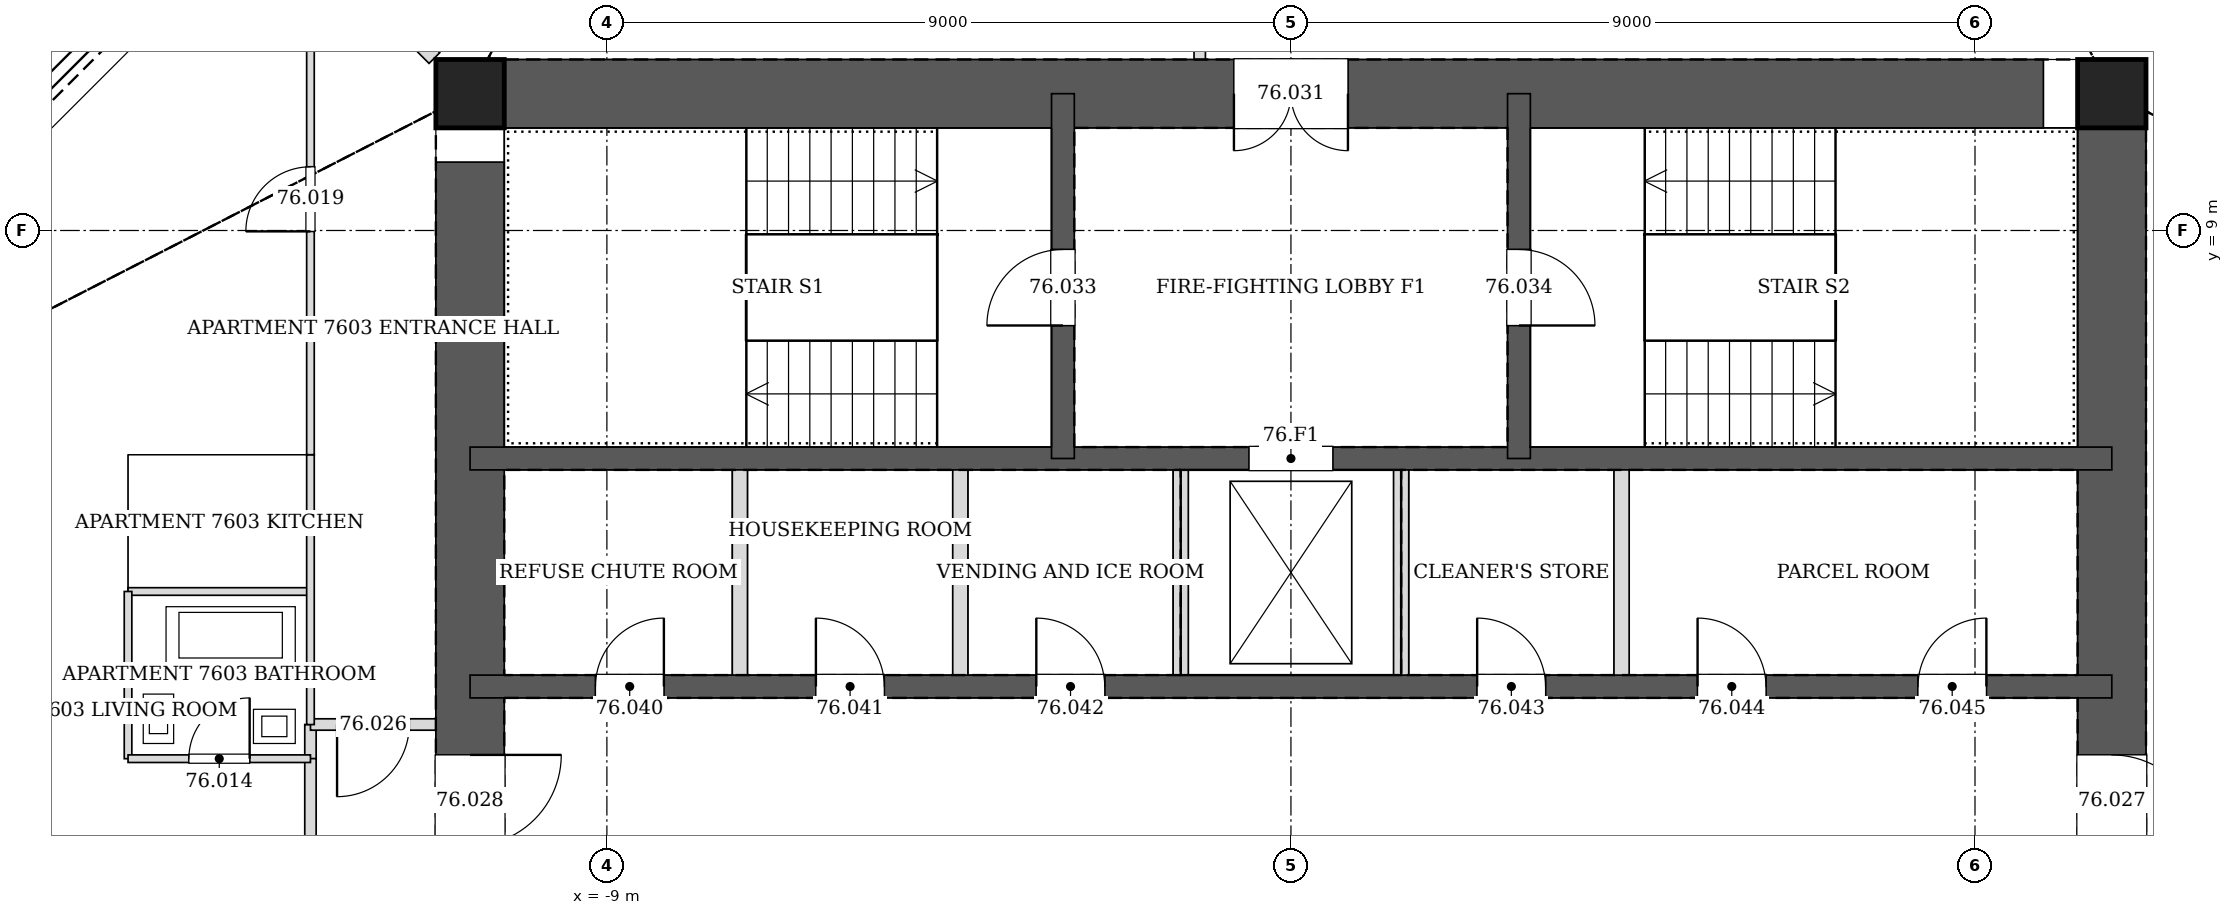
"""IFC4 building model, lengths in metres.
Left out: names, types, materials, properties, quantities, classifications, styles, units other than length and angle.
Written with IfcOpenShell. Run it as: python <this file> out.ifc"""

import sys

from ifc_helpers import new_model, si_unit, direction, frame, frame_2d, origin, origin_2d, place, context, subcontext, project, spatial, rectangle, hollow_rectangle, extrude, element, fill, save


model = new_model("IFC4")
c1 = context("Model", 3, precision=1e-05, world=origin(), true_north=direction((0.0, 1.0)))
c2 = subcontext(c1, "Body", "Model", "MODEL_VIEW")
j1 = project(units=[si_unit("LENGTHUNIT", "METRE"), si_unit("PLANEANGLEUNIT", "RADIAN")], contexts=[c1])
p1 = place(None, origin())
s1 = spatial("IfcSite", under=j1, at=p1, CompositionType="ELEMENT")
p2 = place(p1, origin())
s2 = spatial("IfcBuilding", under=s1, at=p2, CompositionType="ELEMENT")
p3 = place(p2, frame((0.0, 0.0, 308.2)))
s3 = spatial("IfcBuildingStorey", under=s2, at=p3, CompositionType="ELEMENT", Elevation=308.2)
for number, where, z_axis, x_axis in (
    (1, (10.8, 10.8, 0.0), (0.0, 0.0, 1.0), (1.0, 0.0, 0.0)),
    (2, (-10.8, 10.8, 0.0), (0.0, 0.0, 1.0), (1.0, 0.0, 0.0)),
):
    element("IfcColumn", number, at=place(p3, frame(where, z_axis=z_axis, x_axis=x_axis)), inside=s3, PredefinedType="COLUMN", context=c2, shape_type="SweptSolid", body=[
        extrude(hollow_rectangle(XDim=0.9, YDim=0.9, WallThickness=0.04, at=origin_2d()), origin(), (0.0, 0.0, 1.0), 3.4),
    ])
p4 = place(p3, frame((10.8, -10.8, 0.0), z_axis=(0.0, 0.0, 1.0), x_axis=(0.0, 1.0, 0.0)))
e3 = element("IfcWall", 3, at=p4, inside=s3, PredefinedType="SOLIDWALL", context=c2, shape_type="SweptSolid", body=[
    extrude(rectangle(XDim=21.6, YDim=0.9, at=frame_2d((10.8, 0.0))), origin(), (0.0, 0.0, 1.0), 3.4),
])
p5 = place(p4, frame((11.7, 0.0, 0.0)))
e4 = element("IfcOpeningElement", 4, at=p5, cuts=e3, PredefinedType="OPENING", context=c2, shape_type="SweptSolid", body=[
    extrude(rectangle(XDim=1.2, YDim=2.1, at=frame_2d((0.6, 1.05))), frame((0.0, 0.46, 0.0), z_axis=(0.0, -1.0, 0.0), x_axis=(1.0, 0.0, 0.0)), (0.0, 0.0, 1.0), 0.92),
])
p6 = place(p4, frame((8.7, 0.0, 0.0)))
e5 = element("IfcOpeningElement", 5, at=p6, cuts=e3, PredefinedType="OPENING", context=c2, shape_type="SweptSolid", body=[
    extrude(rectangle(XDim=1.2, YDim=2.1, at=frame_2d((0.6, 1.05))), frame((0.0, 0.46, 0.0), z_axis=(0.0, -1.0, 0.0), x_axis=(1.0, 0.0, 0.0)), (0.0, 0.0, 1.0), 0.92),
])
p7 = place(p3, frame((10.8, 10.8, 0.0), z_axis=(0.0, 0.0, 1.0), x_axis=(-1.0, 0.0, 0.0)))
e6 = element("IfcWall", 6, at=p7, inside=s3, PredefinedType="SOLIDWALL", context=c2, shape_type="SweptSolid", body=[
    extrude(rectangle(XDim=21.6, YDim=0.9, at=frame_2d((10.8, 0.0))), origin(), (0.0, 0.0, 1.0), 3.4),
])
p8 = place(p7, frame((10.05, 0.0, 0.0)))
e7 = element("IfcOpeningElement", 7, at=p8, cuts=e6, PredefinedType="OPENING", context=c2, shape_type="SweptSolid", body=[
    extrude(rectangle(XDim=1.5, YDim=2.1, at=frame_2d((0.75, 1.05))), frame((0.0, 0.46, 0.0), z_axis=(0.0, -1.0, 0.0), x_axis=(1.0, 0.0, 0.0)), (0.0, 0.0, 1.0), 0.92),
])
p9 = place(p3, frame((-10.8, 10.8, 0.0), z_axis=(0.0, 0.0, 1.0), x_axis=(0.0, -1.0, 0.0)))
e8 = element("IfcWall", 8, at=p9, inside=s3, PredefinedType="SOLIDWALL", context=c2, shape_type="SweptSolid", body=[
    extrude(rectangle(XDim=21.6, YDim=0.9, at=frame_2d((10.8, 0.0))), origin(), (0.0, 0.0, 1.0), 3.4),
])
p10 = place(p9, frame((8.7, 0.0, 0.0)))
e9 = element("IfcOpeningElement", 9, at=p10, cuts=e8, PredefinedType="OPENING", context=c2, shape_type="SweptSolid", body=[
    extrude(rectangle(XDim=1.2, YDim=2.1, at=frame_2d((0.6, 1.05))), frame((0.0, 0.46, 0.0), z_axis=(0.0, -1.0, 0.0), x_axis=(1.0, 0.0, 0.0)), (0.0, 0.0, 1.0), 0.92),
])
p11 = place(p9, frame((11.7, 0.0, 0.0)))
e10 = element("IfcOpeningElement", 10, at=p11, cuts=e8, PredefinedType="OPENING", context=c2, shape_type="SweptSolid", body=[
    extrude(rectangle(XDim=1.2, YDim=2.1, at=frame_2d((0.6, 1.05))), frame((0.0, 0.46, 0.0), z_axis=(0.0, -1.0, 0.0), x_axis=(1.0, 0.0, 0.0)), (0.0, 0.0, 1.0), 0.92),
])
p12 = place(p3, frame((-10.8, 3.0, 0.0), z_axis=(0.0, 0.0, 1.0), x_axis=(1.0, 0.0, 0.0)))
e11 = element("IfcWall", 11, at=p12, inside=s3, PredefinedType="SOLIDWALL", context=c2, shape_type="SweptSolid", body=[
    extrude(rectangle(XDim=21.6, YDim=0.3, at=frame_2d((10.8, 0.0))), origin(), (0.0, 0.0, 1.0), 3.4),
])
p13 = place(p12, frame((1.65, 0.0, 0.0)))
e12 = element("IfcOpeningElement", 12, at=p13, cuts=e11, PredefinedType="OPENING", context=c2, shape_type="SweptSolid", body=[
    extrude(rectangle(XDim=0.9, YDim=2.1, at=frame_2d((0.45, 1.05))), frame((0.0, 0.16, 0.0), z_axis=(0.0, -1.0, 0.0), x_axis=(1.0, 0.0, 0.0)), (0.0, 0.0, 1.0), 0.32),
])
p14 = place(p12, frame((4.55, 0.0, 0.0)))
e13 = element("IfcOpeningElement", 13, at=p14, cuts=e11, PredefinedType="OPENING", context=c2, shape_type="SweptSolid", body=[
    extrude(rectangle(XDim=0.9, YDim=2.1, at=frame_2d((0.45, 1.05))), frame((0.0, 0.16, 0.0), z_axis=(0.0, -1.0, 0.0), x_axis=(1.0, 0.0, 0.0)), (0.0, 0.0, 1.0), 0.32),
])
p15 = place(p12, frame((7.45, 0.0, 0.0)))
e14 = element("IfcOpeningElement", 14, at=p15, cuts=e11, PredefinedType="OPENING", context=c2, shape_type="SweptSolid", body=[
    extrude(rectangle(XDim=0.9, YDim=2.1, at=frame_2d((0.45, 1.05))), frame((0.0, 0.16, 0.0), z_axis=(0.0, -1.0, 0.0), x_axis=(1.0, 0.0, 0.0)), (0.0, 0.0, 1.0), 0.32),
])
p16 = place(p12, frame((13.25, 0.0, 0.0)))
e15 = element("IfcOpeningElement", 15, at=p16, cuts=e11, PredefinedType="OPENING", context=c2, shape_type="SweptSolid", body=[
    extrude(rectangle(XDim=0.9, YDim=2.1, at=frame_2d((0.45, 1.05))), frame((0.0, 0.16, 0.0), z_axis=(0.0, -1.0, 0.0), x_axis=(1.0, 0.0, 0.0)), (0.0, 0.0, 1.0), 0.32),
])
p17 = place(p12, frame((16.15, 0.0, 0.0)))
e16 = element("IfcOpeningElement", 16, at=p17, cuts=e11, PredefinedType="OPENING", context=c2, shape_type="SweptSolid", body=[
    extrude(rectangle(XDim=0.9, YDim=2.1, at=frame_2d((0.45, 1.05))), frame((0.0, 0.16, 0.0), z_axis=(0.0, -1.0, 0.0), x_axis=(1.0, 0.0, 0.0)), (0.0, 0.0, 1.0), 0.32),
])
p18 = place(p12, frame((19.05, 0.0, 0.0)))
e17 = element("IfcOpeningElement", 17, at=p18, cuts=e11, PredefinedType="OPENING", context=c2, shape_type="SweptSolid", body=[
    extrude(rectangle(XDim=0.9, YDim=2.1, at=frame_2d((0.45, 1.05))), frame((0.0, 0.16, 0.0), z_axis=(0.0, -1.0, 0.0), x_axis=(1.0, 0.0, 0.0)), (0.0, 0.0, 1.0), 0.32),
])
p19 = place(p3, frame((-10.8, 6.0, 0.0), z_axis=(0.0, 0.0, 1.0), x_axis=(1.0, 0.0, 0.0)))
e18 = element("IfcWall", 18, at=p19, inside=s3, PredefinedType="SOLIDWALL", context=c2, shape_type="SweptSolid", body=[
    extrude(rectangle(XDim=21.6, YDim=0.3, at=frame_2d((10.8, 0.0))), origin(), (0.0, 0.0, 1.0), 3.4),
])
p20 = place(p19, frame((10.25, 0.0, 0.0)))
e19 = element("IfcOpeningElement", 19, at=p20, cuts=e18, PredefinedType="OPENING", context=c2, shape_type="SweptSolid", body=[
    extrude(rectangle(XDim=1.1, YDim=2.1, at=frame_2d((0.55, 1.05))), frame((0.0, 0.16, 0.0), z_axis=(0.0, -1.0, 0.0), x_axis=(1.0, 0.0, 0.0)), (0.0, 0.0, 1.0), 0.32),
])
p21 = place(p3, frame((-3.0, 6.0, 0.0), z_axis=(0.0, 0.0, 1.0), x_axis=(0.0, 1.0, 0.0)))
e20 = element("IfcWall", 20, at=p21, inside=s3, PredefinedType="SOLIDWALL", context=c2, shape_type="SweptSolid", body=[
    extrude(rectangle(XDim=4.8, YDim=0.3, at=frame_2d((2.4, 0.0))), origin(), (0.0, 0.0, 1.0), 3.4),
])
p22 = place(p21, frame((1.75, 0.0, 0.0)))
e21 = element("IfcOpeningElement", 21, at=p22, cuts=e20, PredefinedType="OPENING", context=c2, shape_type="SweptSolid", body=[
    extrude(rectangle(XDim=1.0, YDim=2.1, at=frame_2d((0.5, 1.05))), frame((0.0, 0.16, 0.0), z_axis=(0.0, -1.0, 0.0), x_axis=(1.0, 0.0, 0.0)), (0.0, 0.0, 1.0), 0.32),
])
p23 = place(p3, frame((3.0, 6.0, 0.0), z_axis=(0.0, 0.0, 1.0), x_axis=(0.0, 1.0, 0.0)))
e22 = element("IfcWall", 22, at=p23, inside=s3, PredefinedType="SOLIDWALL", context=c2, shape_type="SweptSolid", body=[
    extrude(rectangle(XDim=4.8, YDim=0.3, at=frame_2d((2.4, 0.0))), origin(), (0.0, 0.0, 1.0), 3.4),
])
p24 = place(p23, frame((1.75, 0.0, 0.0)))
e23 = element("IfcOpeningElement", 23, at=p24, cuts=e22, PredefinedType="OPENING", context=c2, shape_type="SweptSolid", body=[
    extrude(rectangle(XDim=1.0, YDim=2.1, at=frame_2d((0.5, 1.05))), frame((0.0, 0.16, 0.0), z_axis=(0.0, -1.0, 0.0), x_axis=(1.0, 0.0, 0.0)), (0.0, 0.0, 1.0), 0.32),
])
p25 = place(p3, frame((-1.2, 12.9, 0.0), z_axis=(0.0, 0.0, 1.0), x_axis=(0.0, -1.0, 0.0)))
e24 = element("IfcWall", 24, at=p25, inside=s3, PredefinedType="PARTITIONING", context=c2, shape_type="SweptSolid", body=[
    extrude(rectangle(XDim=1.65, YDim=0.15, at=frame_2d((0.825, 0.0))), origin(), (0.0, 0.0, 1.0), 3.2),
])
p26 = place(p3, frame((-12.9, 2.5, 0.0), z_axis=(0.0, 0.0, 1.0), x_axis=(0.0, -1.0, 0.0)))
e25 = element("IfcWall", 25, at=p26, inside=s3, PredefinedType="PARTITIONING", context=c2, shape_type="SweptSolid", body=[
    extrude(rectangle(XDim=0.451, YDim=0.15, at=frame_2d((0.226, 0.0))), origin(), (0.0, 0.0, 1.0), 3.2),
])
p27 = place(p3, frame((-12.9, 2.051, 0.0), z_axis=(0.0, 0.0, 1.0), x_axis=(0.0, -1.0, 0.0)))
e26 = element("IfcWall", 26, at=p27, inside=s3, PredefinedType="PARTITIONING", context=c2, shape_type="SweptSolid", body=[
    extrude(rectangle(XDim=1.869, YDim=0.15, at=frame_2d((0.934, 0.0))), origin(), (0.0, 0.0, 1.0), 3.2),
])
p28 = place(p3, frame((-11.25, 2.5, 0.0), z_axis=(0.0, 0.0, 1.0), x_axis=(-1.0, 0.0, 0.0)))
e27 = element("IfcWall", 27, at=p28, inside=s3, PredefinedType="PARTITIONING", context=c2, shape_type="SweptSolid", body=[
    extrude(rectangle(XDim=1.65, YDim=0.15, at=frame_2d((0.825, 0.0))), origin(), (0.0, 0.0, 1.0), 3.2),
])
p29 = place(p28, frame((0.35, 0.0, 0.0)))
e28 = element("IfcOpeningElement", 28, at=p29, cuts=e27, PredefinedType="OPENING", context=c2, shape_type="SweptSolid", body=[
    extrude(rectangle(XDim=0.95, YDim=2.1, at=frame_2d((0.475, 1.05))), frame((0.0, 0.085, 0.0), z_axis=(0.0, -1.0, 0.0), x_axis=(1.0, 0.0, 0.0)), (0.0, 0.0, 1.0), 0.17),
])
p30 = place(p3, frame((-12.838, 12.838, 0.0), z_axis=(0.0, 0.0, 1.0), x_axis=(0.707106781187, -0.707106781187, 0.0)))
e29 = element("IfcWall", 29, at=p30, inside=s3, PredefinedType="PARTITIONING", context=c2, shape_type="SweptSolid", body=[
    extrude(rectangle(XDim=2.219, YDim=0.2, at=frame_2d((1.109, 0.0))), origin(), (0.0, 0.0, 1.0), 2.591),
])
p31 = place(p3, frame((-15.3, 4.25, 0.0), z_axis=(0.0, 0.0, 1.0), x_axis=(1.0, 0.0, 0.0)))
e30 = element("IfcWall", 30, at=p31, inside=s3, PredefinedType="PARTITIONING", context=c2, shape_type="SweptSolid", body=[
    extrude(rectangle(XDim=2.4, YDim=0.1, at=frame_2d((1.2, 0.0))), origin(), (0.0, 0.0, 1.0), 2.588),
])
p32 = place(p3, frame((-12.9, 6.05, 0.0), z_axis=(0.0, 0.0, 1.0), x_axis=(0.0, -1.0, 0.0)))
e31 = element("IfcWall", 31, at=p32, inside=s3, PredefinedType="PARTITIONING", context=c2, shape_type="SweptSolid", body=[
    extrude(rectangle(XDim=3.551, YDim=0.1, at=frame_2d((1.775, 0.0))), origin(), (0.0, 0.0, 1.0), 3.2),
])
p33 = place(p3, frame((-15.3, 4.25, 0.0), z_axis=(0.0, 0.0, 1.0), x_axis=(0.0, -1.0, 0.0)))
e32 = element("IfcWall", 32, at=p33, inside=s3, PredefinedType="PARTITIONING", context=c2, shape_type="SweptSolid", body=[
    extrude(rectangle(XDim=2.2, YDim=0.1, at=frame_2d((1.1, 0.0))), origin(), (0.0, 0.0, 1.0), 3.2),
])
p34 = place(p3, frame((-15.3, 2.05, 0.0), z_axis=(0.0, 0.0, 1.0), x_axis=(1.0, 0.0, 0.0)))
e33 = element("IfcWall", 33, at=p34, inside=s3, PredefinedType="PARTITIONING", context=c2, shape_type="SweptSolid", body=[
    extrude(rectangle(XDim=2.4, YDim=0.1, at=frame_2d((1.2, 0.0))), origin(), (0.0, 0.0, 1.0), 2.588),
])
p35 = place(p34, frame((0.8, 0.0, 0.0)))
e34 = element("IfcOpeningElement", 34, at=p35, cuts=e33, PredefinedType="OPENING", context=c2, shape_type="SweptSolid", body=[
    extrude(rectangle(XDim=0.8, YDim=2.1, at=frame_2d((0.4, 1.05))), frame((0.0, 0.06, 0.0), z_axis=(0.0, -1.0, 0.0), x_axis=(1.0, 0.0, 0.0)), (0.0, 0.0, 1.0), 0.12),
])
p36 = place(p3, frame((-12.9, 6.05, 0.0), z_axis=(0.0, 0.0, 1.0), x_axis=(0.0, 1.0, 0.0)))
e35 = element("IfcWall", 35, at=p36, inside=s3, PredefinedType="PARTITIONING", context=c2, shape_type="SweptSolid", body=[
    extrude(rectangle(XDim=6.726, YDim=0.1, at=frame_2d((3.363, 0.0))), origin(), (0.0, 0.0, 1.0), 2.349),
])
p37 = place(p36, frame((2.938, 0.0, 0.0)))
e36 = element("IfcOpeningElement", 36, at=p37, cuts=e35, PredefinedType="OPENING", context=c2, shape_type="SweptSolid", body=[
    extrude(rectangle(XDim=0.85, YDim=2.1, at=frame_2d((0.425, 1.05))), frame((0.0, 0.06, 0.0), z_axis=(0.0, -1.0, 0.0), x_axis=(1.0, 0.0, 0.0)), (0.0, 0.0, 1.0), 0.12),
])
for number, where, z_axis, x_axis in (
    (37, (-7.25, 3.15, 0.0), (0.0, 0.0, 1.0), (0.0, 1.0, 0.0)),
    (38, (-4.35, 3.15, 0.0), (0.0, 0.0, 1.0), (0.0, 1.0, 0.0)),
    (39, (-1.45, 3.15, 0.0), (0.0, 0.0, 1.0), (0.0, 1.0, 0.0)),
    (40, (1.45, 3.15, 0.0), (0.0, 0.0, 1.0), (0.0, 1.0, 0.0)),
    (41, (4.35, 3.15, 0.0), (0.0, 0.0, 1.0), (0.0, 1.0, 0.0)),
):
    element("IfcWall", number, at=place(p3, frame(where, z_axis=z_axis, x_axis=x_axis)), inside=s3, PredefinedType="PARTITIONING", context=c2, shape_type="SweptSolid", body=[
        extrude(rectangle(XDim=2.7, YDim=0.2, at=frame_2d((1.35, 0.0))), origin(), (0.0, 0.0, 1.0), 3.2),
    ])
p38 = place(p35, origin())
e42 = element("IfcDoor", 42, at=p38, inside=s3, OperationType="SINGLE_SWING_RIGHT", PredefinedType="DOOR", context=c2, shape_type="SweptSolid", body=[
    extrude(rectangle(XDim=0.8, YDim=2.1, at=frame_2d((0.4, 1.05))), frame((0.0, 0.025, 0.0), z_axis=(0.0, -1.0, 0.0), x_axis=(1.0, 0.0, 0.0)), (0.0, 0.0, 1.0), 0.05),
])
fill(e34, e42)
p39 = place(p37, origin())
e43 = element("IfcDoor", 43, at=p39, inside=s3, OperationType="SINGLE_SWING_LEFT", PredefinedType="DOOR", context=c2, shape_type="SweptSolid", body=[
    extrude(rectangle(XDim=0.85, YDim=2.1, at=frame_2d((0.425, 1.05))), frame((0.0, 0.025, 0.0), z_axis=(0.0, -1.0, 0.0), x_axis=(1.0, 0.0, 0.0)), (0.0, 0.0, 1.0), 0.05),
])
fill(e36, e43)
p40 = place(p29, origin())
e44 = element("IfcDoor", 44, at=p40, inside=s3, OperationType="SINGLE_SWING_RIGHT", PredefinedType="DOOR", context=c2, shape_type="SweptSolid", body=[
    extrude(rectangle(XDim=0.95, YDim=2.1, at=frame_2d((0.475, 1.05))), frame((0.0, 0.025, 0.0), z_axis=(0.0, -1.0, 0.0), x_axis=(1.0, 0.0, 0.0)), (0.0, 0.0, 1.0), 0.05),
])
fill(e28, e44)
p41 = place(p5, frame((1.2, 0.0, 0.0), z_axis=(0.0, 0.0, 1.0), x_axis=(-1.0, 0.0, 0.0)))
e45 = element("IfcDoor", 45, at=p41, inside=s3, OperationType="SINGLE_SWING_RIGHT", PredefinedType="DOOR", context=c2, shape_type="SweptSolid", body=[
    extrude(rectangle(XDim=1.2, YDim=2.1, at=frame_2d((0.6, 1.05))), frame((0.0, 0.025, 0.0), z_axis=(0.0, -1.0, 0.0), x_axis=(1.0, 0.0, 0.0)), (0.0, 0.0, 1.0), 0.05),
])
fill(e4, e45)
p42 = place(p10, origin())
e46 = element("IfcDoor", 46, at=p42, inside=s3, OperationType="SINGLE_SWING_LEFT", PredefinedType="DOOR", context=c2, shape_type="SweptSolid", body=[
    extrude(rectangle(XDim=1.2, YDim=2.1, at=frame_2d((0.6, 1.05))), frame((0.0, 0.025, 0.0), z_axis=(0.0, -1.0, 0.0), x_axis=(1.0, 0.0, 0.0)), (0.0, 0.0, 1.0), 0.05),
])
fill(e9, e46)
p43 = place(p8, origin())
e47 = element("IfcDoor", 47, at=p43, inside=s3, OperationType="DOUBLE_DOOR_SINGLE_SWING", PredefinedType="DOOR", context=c2, shape_type="SweptSolid", body=[
    extrude(rectangle(XDim=1.5, YDim=2.1, at=frame_2d((0.75, 1.05))), frame((0.0, 0.025, 0.0), z_axis=(0.0, -1.0, 0.0), x_axis=(1.0, 0.0, 0.0)), (0.0, 0.0, 1.0), 0.05),
])
fill(e7, e47)
p44 = place(p22, origin())
e48 = element("IfcDoor", 48, at=p44, inside=s3, OperationType="SINGLE_SWING_LEFT", PredefinedType="DOOR", context=c2, shape_type="SweptSolid", body=[
    extrude(rectangle(XDim=1.0, YDim=2.1, at=frame_2d((0.5, 1.05))), frame((0.0, 0.025, 0.0), z_axis=(0.0, -1.0, 0.0), x_axis=(1.0, 0.0, 0.0)), (0.0, 0.0, 1.0), 0.05),
])
fill(e21, e48)
p45 = place(p24, frame((1.0, 0.0, 0.0), z_axis=(0.0, 0.0, 1.0), x_axis=(-1.0, 0.0, 0.0)))
e49 = element("IfcDoor", 49, at=p45, inside=s3, OperationType="SINGLE_SWING_RIGHT", PredefinedType="DOOR", context=c2, shape_type="SweptSolid", body=[
    extrude(rectangle(XDim=1.0, YDim=2.1, at=frame_2d((0.5, 1.05))), frame((0.0, 0.025, 0.0), z_axis=(0.0, -1.0, 0.0), x_axis=(1.0, 0.0, 0.0)), (0.0, 0.0, 1.0), 0.05),
])
fill(e23, e49)
p46 = place(p13, origin())
e50 = element("IfcDoor", 50, at=p46, inside=s3, OperationType="SINGLE_SWING_RIGHT", PredefinedType="DOOR", context=c2, shape_type="SweptSolid", body=[
    extrude(rectangle(XDim=0.9, YDim=2.1, at=frame_2d((0.45, 1.05))), frame((0.0, 0.025, 0.0), z_axis=(0.0, -1.0, 0.0), x_axis=(1.0, 0.0, 0.0)), (0.0, 0.0, 1.0), 0.05),
])
fill(e12, e50)
p47 = place(p14, origin())
e51 = element("IfcDoor", 51, at=p47, inside=s3, OperationType="SINGLE_SWING_LEFT", PredefinedType="DOOR", context=c2, shape_type="SweptSolid", body=[
    extrude(rectangle(XDim=0.9, YDim=2.1, at=frame_2d((0.45, 1.05))), frame((0.0, 0.025, 0.0), z_axis=(0.0, -1.0, 0.0), x_axis=(1.0, 0.0, 0.0)), (0.0, 0.0, 1.0), 0.05),
])
fill(e13, e51)
p48 = place(p15, origin())
e52 = element("IfcDoor", 52, at=p48, inside=s3, OperationType="SINGLE_SWING_LEFT", PredefinedType="DOOR", context=c2, shape_type="SweptSolid", body=[
    extrude(rectangle(XDim=0.9, YDim=2.1, at=frame_2d((0.45, 1.05))), frame((0.0, 0.025, 0.0), z_axis=(0.0, -1.0, 0.0), x_axis=(1.0, 0.0, 0.0)), (0.0, 0.0, 1.0), 0.05),
])
fill(e14, e52)
p49 = place(p16, origin())
e53 = element("IfcDoor", 53, at=p49, inside=s3, OperationType="SINGLE_SWING_LEFT", PredefinedType="DOOR", context=c2, shape_type="SweptSolid", body=[
    extrude(rectangle(XDim=0.9, YDim=2.1, at=frame_2d((0.45, 1.05))), frame((0.0, 0.025, 0.0), z_axis=(0.0, -1.0, 0.0), x_axis=(1.0, 0.0, 0.0)), (0.0, 0.0, 1.0), 0.05),
])
fill(e15, e53)
p50 = place(p17, origin())
e54 = element("IfcDoor", 54, at=p50, inside=s3, OperationType="SINGLE_SWING_LEFT", PredefinedType="DOOR", context=c2, shape_type="SweptSolid", body=[
    extrude(rectangle(XDim=0.9, YDim=2.1, at=frame_2d((0.45, 1.05))), frame((0.0, 0.025, 0.0), z_axis=(0.0, -1.0, 0.0), x_axis=(1.0, 0.0, 0.0)), (0.0, 0.0, 1.0), 0.05),
])
fill(e16, e54)
p51 = place(p18, origin())
e55 = element("IfcDoor", 55, at=p51, inside=s3, OperationType="SINGLE_SWING_RIGHT", PredefinedType="DOOR", context=c2, shape_type="SweptSolid", body=[
    extrude(rectangle(XDim=0.9, YDim=2.1, at=frame_2d((0.45, 1.05))), frame((0.0, 0.025, 0.0), z_axis=(0.0, -1.0, 0.0), x_axis=(1.0, 0.0, 0.0)), (0.0, 0.0, 1.0), 0.05),
])
fill(e17, e55)
p52 = place(p20, origin())
e56 = element("IfcDoor", 56, at=p52, inside=s3, OperationType="DOUBLE_DOOR_SLIDING", PredefinedType="DOOR", context=c2, shape_type="SweptSolid", body=[
    extrude(rectangle(XDim=1.1, YDim=2.1, at=frame_2d((0.55, 1.05))), frame((0.0, 0.025, 0.0), z_axis=(0.0, -1.0, 0.0), x_axis=(1.0, 0.0, 0.0)), (0.0, 0.0, 1.0), 0.05),
])
fill(e19, e56)
save(model, sys.argv[1])
